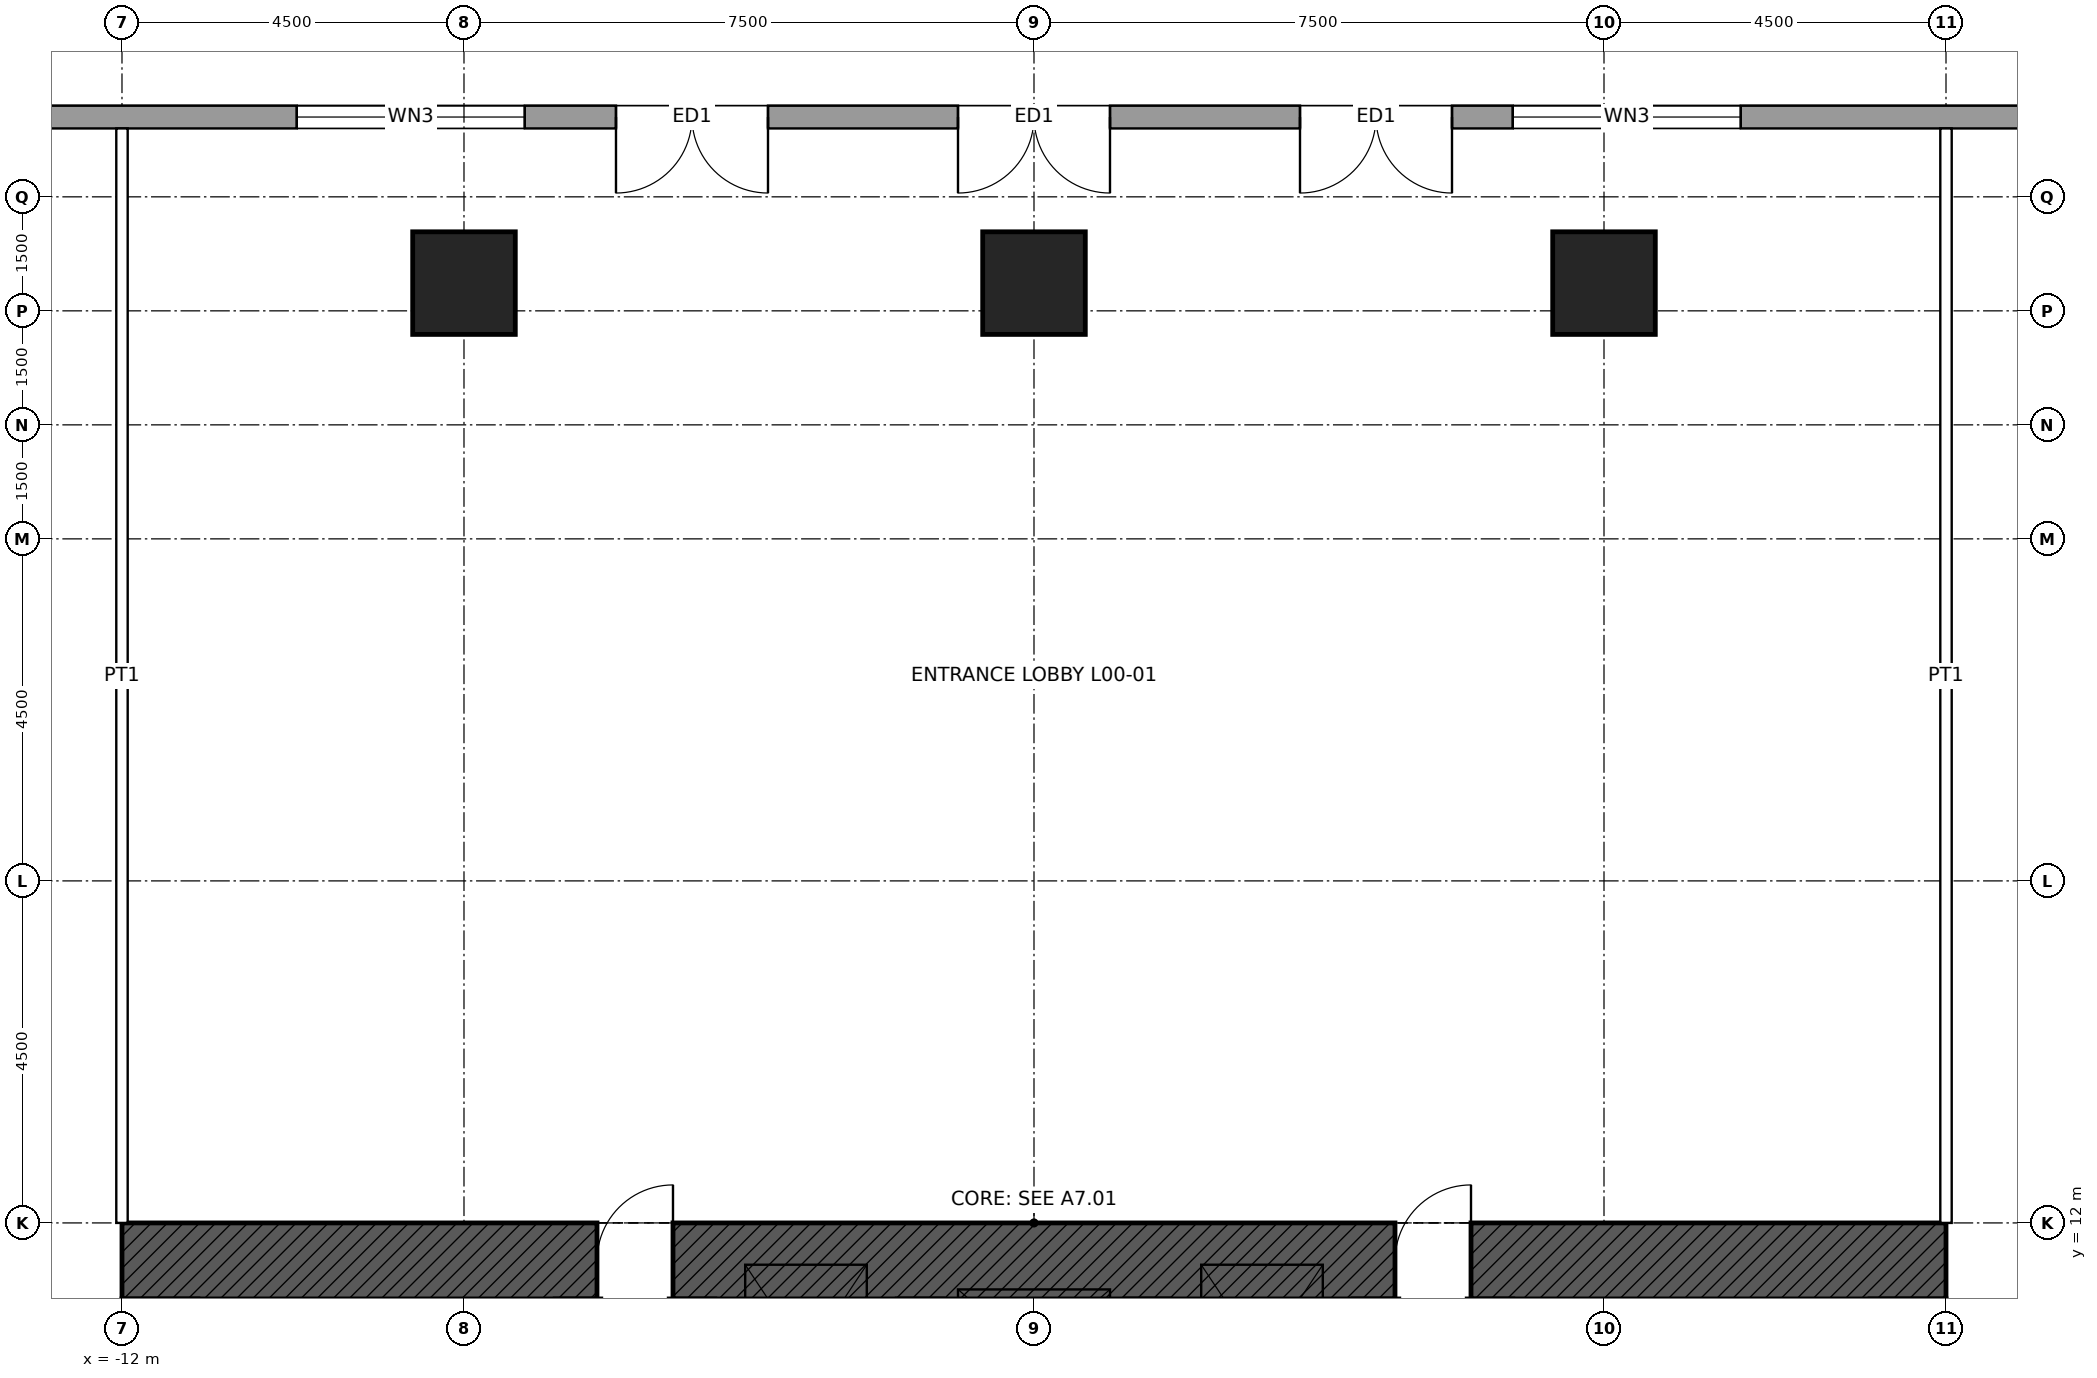
"""IFC4 building model, lengths in metres.
Left out: names, types, materials, properties, quantities, classifications, styles, units other than length and angle.
Written with IfcOpenShell. Run it as: python <this file> out.ifc"""

import sys

from ifc_helpers import new_model, si_unit, direction, frame, frame_2d, origin, origin_2d, place, context, subcontext, project, spatial, rectangle, hollow_rectangle, extrude, element, fill, save


model = new_model("IFC4")
c1 = context("Model", 3, precision=1e-05, world=origin(), true_north=direction((0.0, 1.0)))
c2 = subcontext(c1, "Body", "Model", "MODEL_VIEW")
j1 = project(units=[si_unit("LENGTHUNIT", "METRE"), si_unit("PLANEANGLEUNIT", "RADIAN")], contexts=[c1])
p1 = place(None, origin())
s1 = spatial("IfcSite", under=j1, at=p1, CompositionType="ELEMENT")
p2 = place(p1, origin())
s2 = spatial("IfcBuilding", under=s1, at=p2, CompositionType="ELEMENT")
p3 = place(p2, origin())
s3 = spatial("IfcBuildingStorey", under=s2, at=p3, CompositionType="ELEMENT", Elevation=0.0)
for number, where, z_axis, x_axis in (
    (1, (-7.5, 24.365, -0.3), (0.0, 0.0, 1.0), (1.0, 0.0, 0.0)),
    (2, (0.0, 24.365, -0.3), (0.0, 0.0, 1.0), (1.0, 0.0, 0.0)),
    (3, (7.5, 24.365, -0.3), (0.0, 0.0, 1.0), (1.0, 0.0, 0.0)),
):
    element("IfcColumn", number, at=place(p3, frame(where, z_axis=z_axis, x_axis=x_axis)), inside=s3, PredefinedType="COLUMN", context=c2, shape_type="SweptSolid", body=[
        extrude(hollow_rectangle(XDim=1.35, YDim=1.35, WallThickness=0.1, at=origin_2d()), origin(), (0.0, 0.0, 1.0), 7.5),
    ])
p4 = place(p3, frame((-12.0, 11.5, -0.3), z_axis=(0.0, 0.0, 1.0), x_axis=(1.0, 0.0, 0.0)))
e4 = element("IfcWall", 4, at=p4, inside=s3, PredefinedType="SHEAR", context=c2, shape_type="SweptSolid", body=[
    extrude(rectangle(XDim=24.0, YDim=1.0, at=frame_2d((12.0, 0.0))), origin(), (0.0, 0.0, 1.0), 7.5),
])
p5 = place(p4, frame((6.25, 0.0, 0.3)))
e5 = element("IfcOpeningElement", 5, at=p5, cuts=e4, PredefinedType="OPENING", context=c2, shape_type="SweptSolid", body=[
    extrude(rectangle(XDim=1.0, YDim=2.4, at=frame_2d((0.5, 1.2))), frame((0.0, 0.51, 0.0), z_axis=(0.0, -1.0, 0.0), x_axis=(1.0, 0.0, 0.0)), (0.0, 0.0, 1.0), 1.02),
])
p6 = place(p4, frame((16.75, 0.0, 0.3)))
e6 = element("IfcOpeningElement", 6, at=p6, cuts=e4, PredefinedType="OPENING", context=c2, shape_type="SweptSolid", body=[
    extrude(rectangle(XDim=1.0, YDim=2.4, at=frame_2d((0.5, 1.2))), frame((0.0, 0.51, 0.0), z_axis=(0.0, -1.0, 0.0), x_axis=(1.0, 0.0, 0.0)), (0.0, 0.0, 1.0), 1.02),
])
p7 = place(p3, frame((24.1, 26.55, 0.0), z_axis=(0.0, 0.0, 1.0), x_axis=(-1.0, 0.0, 0.0)))
e7 = element("IfcWall", 7, at=p7, inside=s3, PredefinedType="SOLIDWALL", context=c2, shape_type="SweptSolid", body=[
    extrude(rectangle(XDim=48.2, YDim=0.3, at=frame_2d((24.1, 0.0))), origin(), (0.0, 0.0, 1.0), 6.95),
])
p8 = place(p7, frame((27.6, 0.0, 0.0)))
e8 = element("IfcOpeningElement", 8, at=p8, cuts=e7, PredefinedType="OPENING", context=c2, shape_type="SweptSolid", body=[
    extrude(rectangle(XDim=2.0, YDim=3.0, at=frame_2d((1.0, 1.5))), frame((0.0, 0.16, 0.0), z_axis=(0.0, -1.0, 0.0), x_axis=(1.0, 0.0, 0.0)), (0.0, 0.0, 1.0), 0.32),
])
p9 = place(p7, frame((23.1, 0.0, 0.0)))
e9 = element("IfcOpeningElement", 9, at=p9, cuts=e7, PredefinedType="OPENING", context=c2, shape_type="SweptSolid", body=[
    extrude(rectangle(XDim=2.0, YDim=3.0, at=frame_2d((1.0, 1.5))), frame((0.0, 0.16, 0.0), z_axis=(0.0, -1.0, 0.0), x_axis=(1.0, 0.0, 0.0)), (0.0, 0.0, 1.0), 0.32),
])
p10 = place(p7, frame((18.6, 0.0, 0.0)))
e10 = element("IfcOpeningElement", 10, at=p10, cuts=e7, PredefinedType="OPENING", context=c2, shape_type="SweptSolid", body=[
    extrude(rectangle(XDim=2.0, YDim=3.0, at=frame_2d((1.0, 1.5))), frame((0.0, 0.16, 0.0), z_axis=(0.0, -1.0, 0.0), x_axis=(1.0, 0.0, 0.0)), (0.0, 0.0, 1.0), 0.32),
])
p11 = place(p7, frame((42.8, 0.0, 0.6)))
e11 = element("IfcOpeningElement", 11, at=p11, cuts=e7, PredefinedType="OPENING", context=c2, shape_type="SweptSolid", body=[
    extrude(rectangle(XDim=3.0, YDim=4.5, at=frame_2d((1.5, 2.25))), frame((0.0, 0.16, 0.0), z_axis=(0.0, -1.0, 0.0), x_axis=(1.0, 0.0, 0.0)), (0.0, 0.0, 1.0), 0.32),
])
p12 = place(p7, frame((38.8, 0.0, 0.6)))
e12 = element("IfcOpeningElement", 12, at=p12, cuts=e7, PredefinedType="OPENING", context=c2, shape_type="SweptSolid", body=[
    extrude(rectangle(XDim=3.0, YDim=4.5, at=frame_2d((1.5, 2.25))), frame((0.0, 0.16, 0.0), z_axis=(0.0, -1.0, 0.0), x_axis=(1.0, 0.0, 0.0)), (0.0, 0.0, 1.0), 0.32),
])
p13 = place(p7, frame((30.8, 0.0, 0.6)))
e13 = element("IfcOpeningElement", 13, at=p13, cuts=e7, PredefinedType="OPENING", context=c2, shape_type="SweptSolid", body=[
    extrude(rectangle(XDim=3.0, YDim=4.5, at=frame_2d((1.5, 2.25))), frame((0.0, 0.16, 0.0), z_axis=(0.0, -1.0, 0.0), x_axis=(1.0, 0.0, 0.0)), (0.0, 0.0, 1.0), 0.32),
])
p14 = place(p7, frame((14.8, 0.0, 0.6)))
e14 = element("IfcOpeningElement", 14, at=p14, cuts=e7, PredefinedType="OPENING", context=c2, shape_type="SweptSolid", body=[
    extrude(rectangle(XDim=3.0, YDim=4.5, at=frame_2d((1.5, 2.25))), frame((0.0, 0.16, 0.0), z_axis=(0.0, -1.0, 0.0), x_axis=(1.0, 0.0, 0.0)), (0.0, 0.0, 1.0), 0.32),
])
p15 = place(p7, frame((6.8, 0.0, 0.6)))
e15 = element("IfcOpeningElement", 15, at=p15, cuts=e7, PredefinedType="OPENING", context=c2, shape_type="SweptSolid", body=[
    extrude(rectangle(XDim=3.0, YDim=4.5, at=frame_2d((1.5, 2.25))), frame((0.0, 0.16, 0.0), z_axis=(0.0, -1.0, 0.0), x_axis=(1.0, 0.0, 0.0)), (0.0, 0.0, 1.0), 0.32),
])
p16 = place(p7, frame((2.8, 0.0, 0.6)))
e16 = element("IfcOpeningElement", 16, at=p16, cuts=e7, PredefinedType="OPENING", context=c2, shape_type="SweptSolid", body=[
    extrude(rectangle(XDim=3.0, YDim=4.5, at=frame_2d((1.5, 2.25))), frame((0.0, 0.16, 0.0), z_axis=(0.0, -1.0, 0.0), x_axis=(1.0, 0.0, 0.0)), (0.0, 0.0, 1.0), 0.32),
])
p17 = place(p3, frame((-12.0, 12.0, 0.0), z_axis=(0.0, 0.0, 1.0), x_axis=(0.0, 1.0, 0.0)))
e17 = element("IfcWall", 17, at=p17, inside=s3, PredefinedType="PARTITIONING", context=c2, shape_type="SweptSolid", body=[
    extrude(rectangle(XDim=14.4, YDim=0.15, at=frame_2d((7.2, 0.0))), origin(), (0.0, 0.0, 1.0), 5.909),
])
p18 = place(p3, frame((12.0, 12.0, 0.0), z_axis=(0.0, 0.0, 1.0), x_axis=(0.0, 1.0, 0.0)))
e18 = element("IfcWall", 18, at=p18, inside=s3, PredefinedType="PARTITIONING", context=c2, shape_type="SweptSolid", body=[
    extrude(rectangle(XDim=14.4, YDim=0.15, at=frame_2d((7.2, 0.0))), origin(), (0.0, 0.0, 1.0), 6.95),
])
p19 = place(p8, origin())
e19 = element("IfcDoor", 19, at=p19, inside=s3, OperationType="DOUBLE_DOOR_SINGLE_SWING", PredefinedType="DOOR", context=c2, shape_type="SweptSolid", body=[
    extrude(rectangle(XDim=2.0, YDim=3.0, at=frame_2d((1.0, 1.5))), frame((0.0, 0.025, 0.0), z_axis=(0.0, -1.0, 0.0), x_axis=(1.0, 0.0, 0.0)), (0.0, 0.0, 1.0), 0.05),
])
fill(e8, e19)
p20 = place(p9, origin())
e20 = element("IfcDoor", 20, at=p20, inside=s3, OperationType="DOUBLE_DOOR_SINGLE_SWING", PredefinedType="DOOR", context=c2, shape_type="SweptSolid", body=[
    extrude(rectangle(XDim=2.0, YDim=3.0, at=frame_2d((1.0, 1.5))), frame((0.0, 0.025, 0.0), z_axis=(0.0, -1.0, 0.0), x_axis=(1.0, 0.0, 0.0)), (0.0, 0.0, 1.0), 0.05),
])
fill(e9, e20)
p21 = place(p10, origin())
e21 = element("IfcDoor", 21, at=p21, inside=s3, OperationType="DOUBLE_DOOR_SINGLE_SWING", PredefinedType="DOOR", context=c2, shape_type="SweptSolid", body=[
    extrude(rectangle(XDim=2.0, YDim=3.0, at=frame_2d((1.0, 1.5))), frame((0.0, 0.025, 0.0), z_axis=(0.0, -1.0, 0.0), x_axis=(1.0, 0.0, 0.0)), (0.0, 0.0, 1.0), 0.05),
])
fill(e10, e21)
p22 = place(p13, origin())
e22 = element("IfcWindow", 22, at=p22, inside=s3, PartitioningType="SINGLE_PANEL", PredefinedType="WINDOW", context=c2, shape_type="SweptSolid", body=[
    extrude(rectangle(XDim=3.0, YDim=4.5, at=frame_2d((1.5, 2.25))), frame((0.0, 0.03, 0.0), z_axis=(0.0, -1.0, 0.0), x_axis=(1.0, 0.0, 0.0)), (0.0, 0.0, 1.0), 0.06),
])
fill(e13, e22)
p23 = place(p14, origin())
e23 = element("IfcWindow", 23, at=p23, inside=s3, PartitioningType="SINGLE_PANEL", PredefinedType="WINDOW", context=c2, shape_type="SweptSolid", body=[
    extrude(rectangle(XDim=3.0, YDim=4.5, at=frame_2d((1.5, 2.25))), frame((0.0, 0.03, 0.0), z_axis=(0.0, -1.0, 0.0), x_axis=(1.0, 0.0, 0.0)), (0.0, 0.0, 1.0), 0.06),
])
fill(e14, e23)
p24 = place(p5, origin())
e24 = element("IfcDoor", 24, at=p24, inside=s3, OperationType="SINGLE_SWING_RIGHT", PredefinedType="DOOR", context=c2, shape_type="SweptSolid", body=[
    extrude(rectangle(XDim=1.0, YDim=2.4, at=frame_2d((0.5, 1.2))), frame((0.0, 0.025, 0.0), z_axis=(0.0, -1.0, 0.0), x_axis=(1.0, 0.0, 0.0)), (0.0, 0.0, 1.0), 0.05),
])
fill(e5, e24)
p25 = place(p6, origin())
e25 = element("IfcDoor", 25, at=p25, inside=s3, OperationType="SINGLE_SWING_RIGHT", PredefinedType="DOOR", context=c2, shape_type="SweptSolid", body=[
    extrude(rectangle(XDim=1.0, YDim=2.4, at=frame_2d((0.5, 1.2))), frame((0.0, 0.025, 0.0), z_axis=(0.0, -1.0, 0.0), x_axis=(1.0, 0.0, 0.0)), (0.0, 0.0, 1.0), 0.05),
])
fill(e6, e25)
save(model, sys.argv[1])
